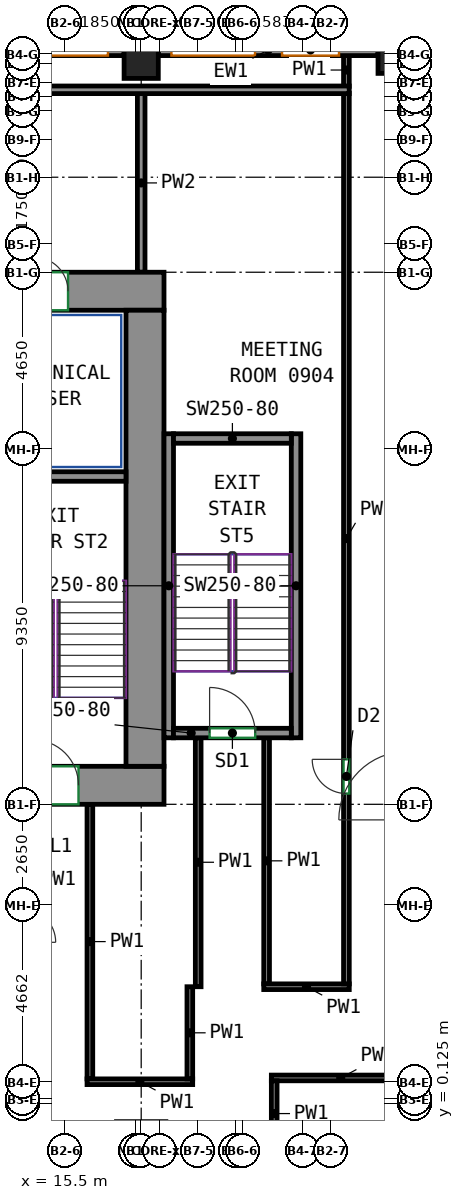
"""IFC4 building model, lengths in metres.
Left out: names, types, materials, properties, quantities, classifications, styles, units other than length and angle.
Written with IfcOpenShell. Run it as: python <this file> out.ifc"""

import sys

from ifc_helpers import new_model, si_unit, direction, frame, frame_2d, origin, origin_2d, place, context, subcontext, project, spatial, rectangle, extrude, source, transform, mapped, element, fill, save


model = new_model("IFC4")
c1 = context("Model", 3, precision=1e-05, world=origin(), true_north=direction((0.0, 1.0)))
c2 = subcontext(c1, "Body", "Model", "MODEL_VIEW")
j1 = project(units=[si_unit("LENGTHUNIT", "METRE"), si_unit("PLANEANGLEUNIT", "RADIAN")], contexts=[c1])
p1 = place(None, origin())
s1 = spatial("IfcSite", under=j1, at=p1, CompositionType="ELEMENT")
p2 = place(p1, origin())
s2 = spatial("IfcBuilding", under=s1, at=p2, CompositionType="ELEMENT")
p3 = place(p2, frame((0.0, 0.0, 43.0)))
s3 = spatial("IfcBuildingStorey", under=s2, at=p3, CompositionType="ELEMENT", Elevation=43.0)
m1 = source(origin(), c2, "Body", "SweptSolid", [
    extrude(rectangle(XDim=0.9, YDim=0.9, at=origin_2d()), origin(), (0.0, 0.0, 1.0), 3.72),
])
for number, where, z_axis, x_axis in (
    (1, (17.5, 27.55, 0.0), (0.0, 0.0, 1.0), (1.0, 0.0, 0.0)),
    (2, (24.182, 27.682, 0.0), (0.0, 0.0, 1.0), (1.0, 0.0, 0.0)),
):
    element("IfcColumn", number, at=place(p3, frame(where, z_axis=z_axis, x_axis=x_axis)), inside=s3, PredefinedType="COLUMN", context=c2, shape_type="MappedRepresentation", body=[
        mapped(m1, transform((0.0, 0.0, 0.0))),
    ])
m2 = source(origin(), c2, "Body", "SweptSolid", [
    extrude(rectangle(XDim=5.63, YDim=1.0, at=frame_2d((2.815, 0.0))), origin(), (0.0, 0.0, 1.0), 3.72),
])
p4 = place(p3, frame((12.47, 8.5, 0.0), z_axis=(0.0, 0.0, 1.0), x_axis=(1.0, 0.0, 0.0)))
e3 = element("IfcWall", 3, at=p4, inside=s3, PredefinedType="SHEAR", context=c2, shape_type="MappedRepresentation", body=[
    mapped(m2, transform((0.0, 0.0, 0.0))),
])
p5 = place(p4, frame((2.18, 0.0, 0.0)))
e4 = element("IfcOpeningElement", 4, at=p5, cuts=e3, PredefinedType="OPENING", context=c2, shape_type="SweptSolid", body=[
    extrude(rectangle(XDim=1.2, YDim=2.1, at=frame_2d((0.6, 1.05))), frame((0.0, 0.51, 0.0), z_axis=(0.0, -1.0, 0.0), x_axis=(1.0, 0.0, 0.0)), (0.0, 0.0, 1.0), 1.02),
])
m3 = source(origin(), c2, "Body", "SweptSolid", [
    extrude(rectangle(XDim=34.1, YDim=1.0, at=frame_2d((17.05, 0.0))), origin(), (0.0, 0.0, 1.0), 3.72),
])
p6 = place(p3, frame((-16.0, 21.5, 0.0), z_axis=(0.0, 0.0, 1.0), x_axis=(1.0, 0.0, 0.0)))
e5 = element("IfcWall", 5, at=p6, inside=s3, PredefinedType="SHEAR", context=c2, shape_type="MappedRepresentation", body=[
    mapped(m3, transform((0.0, 0.0, 0.0))),
])
p7 = place(p6, frame((8.52, 0.0, 0.0)))
e6 = element("IfcOpeningElement", 6, at=p7, cuts=e5, PredefinedType="OPENING", context=c2, shape_type="SweptSolid", body=[
    extrude(rectangle(XDim=0.9, YDim=2.1, at=frame_2d((0.45, 1.05))), frame((0.0, 0.51, 0.0), z_axis=(0.0, -1.0, 0.0), x_axis=(1.0, 0.0, 0.0)), (0.0, 0.0, 1.0), 1.02),
])
p8 = place(p6, frame((14.55, 0.0, 0.0)))
e7 = element("IfcOpeningElement", 7, at=p8, cuts=e5, PredefinedType="OPENING", context=c2, shape_type="SweptSolid", body=[
    extrude(rectangle(XDim=0.9, YDim=2.1, at=frame_2d((0.45, 1.05))), frame((0.0, 0.51, 0.0), z_axis=(0.0, -1.0, 0.0), x_axis=(1.0, 0.0, 0.0)), (0.0, 0.0, 1.0), 1.02),
])
p9 = place(p6, frame((19.374, 0.0, 0.0)))
e8 = element("IfcOpeningElement", 8, at=p9, cuts=e5, PredefinedType="OPENING", context=c2, shape_type="SweptSolid", body=[
    extrude(rectangle(XDim=0.9, YDim=2.1, at=frame_2d((0.45, 1.05))), frame((0.0, 0.51, 0.0), z_axis=(0.0, -1.0, 0.0), x_axis=(1.0, 0.0, 0.0)), (0.0, 0.0, 1.0), 1.02),
])
p10 = place(p6, frame((25.404, 0.0, 0.0)))
e9 = element("IfcOpeningElement", 9, at=p10, cuts=e5, PredefinedType="OPENING", context=c2, shape_type="SweptSolid", body=[
    extrude(rectangle(XDim=0.9, YDim=2.1, at=frame_2d((0.45, 1.05))), frame((0.0, 0.51, 0.0), z_axis=(0.0, -1.0, 0.0), x_axis=(1.0, 0.0, 0.0)), (0.0, 0.0, 1.0), 1.02),
])
p11 = place(p6, frame((2.525, 0.0, 0.0)))
e10 = element("IfcOpeningElement", 10, at=p11, cuts=e5, PredefinedType="OPENING", context=c2, shape_type="SweptSolid", body=[
    extrude(rectangle(XDim=0.9, YDim=2.1, at=frame_2d((0.45, 1.05))), frame((0.0, 0.51, 0.0), z_axis=(0.0, -1.0, 0.0), x_axis=(1.0, 0.0, 0.0)), (0.0, 0.0, 1.0), 1.02),
])
p12 = place(p6, frame((30.675, 0.0, 0.0)))
e11 = element("IfcOpeningElement", 11, at=p12, cuts=e5, PredefinedType="OPENING", context=c2, shape_type="SweptSolid", body=[
    extrude(rectangle(XDim=0.9, YDim=2.1, at=frame_2d((0.45, 1.05))), frame((0.0, 0.51, 0.0), z_axis=(0.0, -1.0, 0.0), x_axis=(1.0, 0.0, 0.0)), (0.0, 0.0, 1.0), 1.02),
])
m4 = source(origin(), c2, "Body", "SweptSolid", [
    extrude(rectangle(XDim=12.0, YDim=1.0, at=frame_2d((6.0, 0.0))), origin(), (0.0, 0.0, 1.0), 3.72),
])
p13 = place(p3, frame((17.6, 9.0, 0.0), z_axis=(0.0, 0.0, 1.0), x_axis=(0.0, 1.0, 0.0)))
e12 = element("IfcWall", 12, at=p13, inside=s3, PredefinedType="SHEAR", context=c2, shape_type="MappedRepresentation", body=[
    mapped(m4, transform((0.0, 0.0, 0.0))),
])
m5 = source(origin(), c2, "Body", "SweptSolid", [
    extrude(rectangle(XDim=3.7, YDim=0.25, at=frame_2d((1.85, 0.0))), origin(), (0.0, 0.0, 1.0), 3.72),
])
p14 = place(p3, frame((13.4, 16.625, 0.0), z_axis=(0.0, 0.0, 1.0), x_axis=(1.0, 0.0, 0.0)))
e13 = element("IfcWall", 13, at=p14, inside=s3, PredefinedType="SHEAR", context=c2, shape_type="MappedRepresentation", body=[
    mapped(m5, transform((0.0, 0.0, 0.0))),
])
m6 = source(origin(), c2, "Body", "SweptSolid", [
    extrude(rectangle(XDim=8.0, YDim=0.25, at=frame_2d((4.0, 0.0))), origin(), (0.0, 0.0, 1.0), 3.72),
])
for number, where, z_axis, x_axis in (
    (14, (18.225, 9.75, 0.0), (0.0, 0.0, 1.0), (0.0, 1.0, 0.0)),
    (15, (21.575, 9.75, 0.0), (0.0, 0.0, 1.0), (0.0, 1.0, 0.0)),
):
    element("IfcWall", number, at=place(p3, frame(where, z_axis=z_axis, x_axis=x_axis)), inside=s3, PredefinedType="SHEAR", context=c2, shape_type="MappedRepresentation", body=[
        mapped(m6, transform((0.0, 0.0, 0.0))),
    ])
m7 = source(origin(), c2, "Body", "SweptSolid", [
    extrude(rectangle(XDim=3.1, YDim=0.25, at=frame_2d((1.55, 0.0))), origin(), (0.0, 0.0, 1.0), 3.72),
])
p15 = place(p3, frame((18.35, 9.875, 0.0), z_axis=(0.0, 0.0, 1.0), x_axis=(1.0, 0.0, 0.0)))
e16 = element("IfcWall", 16, at=p15, inside=s3, PredefinedType="SHEAR", context=c2, shape_type="MappedRepresentation", body=[
    mapped(m7, transform((0.0, 0.0, 0.0))),
])
p16 = place(p15, frame((0.95, 0.0, 0.0)))
e17 = element("IfcOpeningElement", 17, at=p16, cuts=e16, PredefinedType="OPENING", context=c2, shape_type="SweptSolid", body=[
    extrude(rectangle(XDim=1.2, YDim=2.1, at=frame_2d((0.6, 1.05))), frame((0.0, 0.135, 0.0), z_axis=(0.0, -1.0, 0.0), x_axis=(1.0, 0.0, 0.0)), (0.0, 0.0, 1.0), 0.27),
])
p17 = place(p3, frame((18.35, 17.625, 0.0), z_axis=(0.0, 0.0, 1.0), x_axis=(1.0, 0.0, 0.0)))
e18 = element("IfcWall", 18, at=p17, inside=s3, PredefinedType="SHEAR", context=c2, shape_type="MappedRepresentation", body=[
    mapped(m7, transform((0.0, 0.0, 0.0))),
])
m8 = source(origin(), c2, "Body", "SweptSolid", [
    extrude(rectangle(XDim=5.782, YDim=0.3, at=frame_2d((2.891, 0.0))), origin(), (0.0, 0.0, 1.0), 3.72),
])
p18 = place(p3, frame((23.732, 27.85, 0.0), z_axis=(0.0, 0.0, 1.0), x_axis=(-1.0, 0.0, 0.0)))
e19 = element("IfcWall", 19, at=p18, inside=s3, PredefinedType="SOLIDWALL", context=c2, shape_type="MappedRepresentation", body=[
    mapped(m8, transform((0.0, 0.0, 0.0))),
])
p19 = place(p18, frame((1.026, 0.0, 0.7)))
e20 = element("IfcOpeningElement", 20, at=p19, cuts=e19, PredefinedType="OPENING", context=c2, shape_type="SweptSolid", body=[
    extrude(rectangle(XDim=1.5, YDim=2.25, at=frame_2d((0.75, 1.125))), frame((0.0, 0.16, 0.0), z_axis=(0.0, -1.0, 0.0), x_axis=(1.0, 0.0, 0.0)), (0.0, 0.0, 1.0), 0.32),
])
p20 = place(p18, frame((3.236, 0.0, 0.7)))
e21 = element("IfcOpeningElement", 21, at=p20, cuts=e19, PredefinedType="OPENING", context=c2, shape_type="SweptSolid", body=[
    extrude(rectangle(XDim=2.2, YDim=2.25, at=frame_2d((1.1, 1.125))), frame((0.0, 0.16, 0.0), z_axis=(0.0, -1.0, 0.0), x_axis=(1.0, 0.0, 0.0)), (0.0, 0.0, 1.0), 0.32),
])
m9 = source(origin(), c2, "Body", "SweptSolid", [
    extrude(rectangle(XDim=6.1, YDim=0.3, at=frame_2d((3.05, 0.0))), origin(), (0.0, 0.0, 1.0), 3.72),
])
p21 = place(p3, frame((17.05, 27.85, 0.0), z_axis=(0.0, 0.0, 1.0), x_axis=(-1.0, 0.0, 0.0)))
e22 = element("IfcWall", 22, at=p21, inside=s3, PredefinedType="SOLIDWALL", context=c2, shape_type="MappedRepresentation", body=[
    mapped(m9, transform((0.0, 0.0, 0.0))),
])
p22 = place(p21, frame((0.425, 0.0, 0.7)))
e23 = element("IfcOpeningElement", 23, at=p22, cuts=e22, PredefinedType="OPENING", context=c2, shape_type="SweptSolid", body=[
    extrude(rectangle(XDim=2.2, YDim=2.25, at=frame_2d((1.1, 1.125))), frame((0.0, 0.16, 0.0), z_axis=(0.0, -1.0, 0.0), x_axis=(1.0, 0.0, 0.0)), (0.0, 0.0, 1.0), 0.32),
])
p23 = place(p21, frame((3.475, 0.0, 0.7)))
e24 = element("IfcOpeningElement", 24, at=p23, cuts=e22, PredefinedType="OPENING", context=c2, shape_type="SweptSolid", body=[
    extrude(rectangle(XDim=2.2, YDim=2.25, at=frame_2d((1.1, 1.125))), frame((0.0, 0.16, 0.0), z_axis=(0.0, -1.0, 0.0), x_axis=(1.0, 0.0, 0.0)), (0.0, 0.0, 1.0), 0.32),
])
p24 = place(p3, frame((16.15, 0.775, 0.0), z_axis=(0.0, 0.0, 1.0), x_axis=(0.0, 1.0, 0.0)))
e25 = element("IfcWall", 25, at=p24, inside=s3, PredefinedType="PARTITIONING", context=c2, shape_type="SweptSolid", body=[
    extrude(rectangle(XDim=7.225, YDim=0.15, at=frame_2d((3.613, 0.0))), origin(), (0.0, 0.0, 1.0), 3.72),
])
p25 = place(p3, frame((16.075, 0.7, 0.0), z_axis=(0.0, 0.0, 1.0), x_axis=(1.0, 0.0, 0.0)))
e26 = element("IfcWall", 26, at=p25, inside=s3, PredefinedType="PARTITIONING", context=c2, shape_type="SweptSolid", body=[
    extrude(rectangle(XDim=2.78, YDim=0.15, at=frame_2d((1.39, 0.0))), origin(), (0.0, 0.0, 1.0), 3.72),
])
p26 = place(p3, frame((18.78, 3.2, 0.0), z_axis=(0.0, 0.0, 1.0), x_axis=(0.0, -1.0, 0.0)))
e27 = element("IfcWall", 27, at=p26, inside=s3, PredefinedType="PARTITIONING", context=c2, shape_type="SweptSolid", body=[
    extrude(rectangle(XDim=2.425, YDim=0.15, at=frame_2d((1.212, 0.0))), origin(), (0.0, 0.0, 1.0), 3.72),
])
p27 = place(p3, frame((19.0, 9.75, 0.0), z_axis=(0.0, 0.0, 1.0), x_axis=(0.0, -1.0, 0.0)))
e28 = element("IfcWall", 28, at=p27, inside=s3, PredefinedType="PARTITIONING", context=c2, shape_type="SweptSolid", body=[
    extrude(rectangle(XDim=6.55, YDim=0.15, at=frame_2d((3.275, 0.0))), origin(), (0.0, 0.0, 1.0), 3.72),
])
p28 = place(p3, frame((20.8, 3.275, 0.0), z_axis=(0.0, 0.0, 1.0), x_axis=(0.0, 1.0, 0.0)))
e29 = element("IfcWall", 29, at=p28, inside=s3, PredefinedType="PARTITIONING", context=c2, shape_type="SweptSolid", body=[
    extrude(rectangle(XDim=6.475, YDim=0.15, at=frame_2d((3.238, 0.0))), origin(), (0.0, 0.0, 1.0), 3.72),
])
p29 = place(p3, frame((20.725, 3.2, 0.0), z_axis=(0.0, 0.0, 1.0), x_axis=(1.0, 0.0, 0.0)))
e30 = element("IfcWall", 30, at=p29, inside=s3, PredefinedType="PARTITIONING", context=c2, shape_type="SweptSolid", body=[
    extrude(rectangle(XDim=2.25, YDim=0.15, at=frame_2d((1.125, 0.0))), origin(), (0.0, 0.0, 1.0), 3.72),
])
p30 = place(p3, frame((22.9, 3.275, 0.0), z_axis=(0.0, 0.0, 1.0), x_axis=(0.0, 1.0, 0.0)))
e31 = element("IfcWall", 31, at=p30, inside=s3, PredefinedType="PARTITIONING", context=c2, shape_type="SweptSolid", body=[
    extrude(rectangle(XDim=23.435, YDim=0.15, at=frame_2d((11.718, 0.0))), origin(), (0.0, 0.0, 1.0), 3.72),
])
p31 = place(p30, frame((5.008, 0.0, 0.0)))
e32 = element("IfcOpeningElement", 32, at=p31, cuts=e31, PredefinedType="OPENING", context=c2, shape_type="SweptSolid", body=[
    extrude(rectangle(XDim=0.9, YDim=2.1, at=frame_2d((0.45, 1.05))), frame((0.0, 0.085, 0.0), z_axis=(0.0, -1.0, 0.0), x_axis=(1.0, 0.0, 0.0)), (0.0, 0.0, 1.0), 0.17),
])
p32 = place(p3, frame((20.925, 0.8, 0.0), z_axis=(0.0, 0.0, 1.0), x_axis=(1.0, 0.0, 0.0)))
e33 = element("IfcWall", 33, at=p32, inside=s3, PredefinedType="PARTITIONING", context=c2, shape_type="SweptSolid", body=[
    extrude(rectangle(XDim=3.65, YDim=0.15, at=frame_2d((1.825, 0.0))), origin(), (0.0, 0.0, 1.0), 3.72),
])
p33 = place(p3, frame((21.0, -1.0, 0.0), z_axis=(0.0, 0.0, 1.0), x_axis=(0.0, 1.0, 0.0)))
e34 = element("IfcWall", 34, at=p33, inside=s3, PredefinedType="PARTITIONING", context=c2, shape_type="SweptSolid", body=[
    extrude(rectangle(XDim=1.725, YDim=0.15, at=frame_2d((0.863, 0.0))), origin(), (0.0, 0.0, 1.0), 3.72),
])
p34 = place(p3, frame((22.9, 26.891, 0.0), z_axis=(0.0, 0.0, 1.0), x_axis=(0.0, 1.0, 0.0)))
e35 = element("IfcWall", 35, at=p34, inside=s3, PredefinedType="PARTITIONING", context=c2, shape_type="SweptSolid", body=[
    extrude(rectangle(XDim=0.859, YDim=0.15, at=frame_2d((0.429, 0.0))), origin(), (0.0, 0.0, 1.0), 3.72),
])
p35 = place(p3, frame((17.5, 22.0, 0.0), z_axis=(0.0, 0.0, 1.0), x_axis=(0.0, 1.0, 0.0)))
e36 = element("IfcWall", 36, at=p35, inside=s3, PredefinedType="PARTITIONING", context=c2, shape_type="SweptSolid", body=[
    extrude(rectangle(XDim=4.7, YDim=0.2, at=frame_2d((2.35, 0.0))), origin(), (0.0, 0.0, 1.0), 3.72),
])
p36 = place(p3, frame((-20.874, 26.8, 0.0), z_axis=(0.0, 0.0, 1.0), x_axis=(1.0, 0.0, 0.0)))
e37 = element("IfcWall", 37, at=p36, inside=s3, PredefinedType="PARTITIONING", context=c2, shape_type="SweptSolid", body=[
    extrude(rectangle(XDim=43.848, YDim=0.2, at=frame_2d((21.924, 0.0))), origin(), (0.0, 0.0, 1.0), 3.72),
])
p37 = place(p36, frame((31.863, 0.0, 0.0)))
e38 = element("IfcOpeningElement", 38, at=p37, cuts=e37, PredefinedType="OPENING", context=c2, shape_type="SweptSolid", body=[
    extrude(rectangle(XDim=1.0, YDim=2.1, at=frame_2d((0.5, 1.05))), frame((0.0, 0.11, 0.0), z_axis=(0.0, -1.0, 0.0), x_axis=(1.0, 0.0, 0.0)), (0.0, 0.0, 1.0), 0.22),
])
p38 = place(p12, origin())
e39 = element("IfcDoor", 39, at=p38, inside=s3, OperationType="SINGLE_SWING_LEFT", PredefinedType="DOOR", context=c2, shape_type="SweptSolid", body=[
    extrude(rectangle(XDim=0.9, YDim=2.1, at=frame_2d((0.45, 1.05))), frame((0.0, -0.355, 0.0), z_axis=(0.0, -1.0, 0.0), x_axis=(1.0, 0.0, 0.0)), (0.0, 0.0, 1.0), 0.05),
])
fill(e11, e39)
p39 = place(p5, origin())
e40 = element("IfcDoor", 40, at=p39, inside=s3, OperationType="DOUBLE_DOOR_SINGLE_SWING", PredefinedType="DOOR", context=c2, shape_type="SweptSolid", body=[
    extrude(rectangle(XDim=1.2, YDim=2.1, at=frame_2d((0.6, 1.05))), frame((0.0, 0.405, 0.0), z_axis=(0.0, -1.0, 0.0), x_axis=(1.0, 0.0, 0.0)), (0.0, 0.0, 1.0), 0.05),
])
fill(e4, e40)
p40 = place(p16, origin())
e41 = element("IfcDoor", 41, at=p40, inside=s3, OperationType="DOUBLE_DOOR_SINGLE_SWING", PredefinedType="DOOR", context=c2, shape_type="SweptSolid", body=[
    extrude(rectangle(XDim=1.2, YDim=2.1, at=frame_2d((0.6, 1.05))), frame((0.0, 0.025, 0.0), z_axis=(0.0, -1.0, 0.0), x_axis=(1.0, 0.0, 0.0)), (0.0, 0.0, 1.0), 0.05),
])
fill(e17, e41)
p41 = place(p31, origin())
e42 = element("IfcDoor", 42, at=p41, inside=s3, OperationType="SINGLE_SWING_RIGHT", PredefinedType="DOOR", context=c2, shape_type="SweptSolid", body=[
    extrude(rectangle(XDim=0.9, YDim=2.1, at=frame_2d((0.45, 1.05))), frame((0.0, 0.025, 0.0), z_axis=(0.0, -1.0, 0.0), x_axis=(1.0, 0.0, 0.0)), (0.0, 0.0, 1.0), 0.05),
])
fill(e32, e42)
save(model, sys.argv[1])
